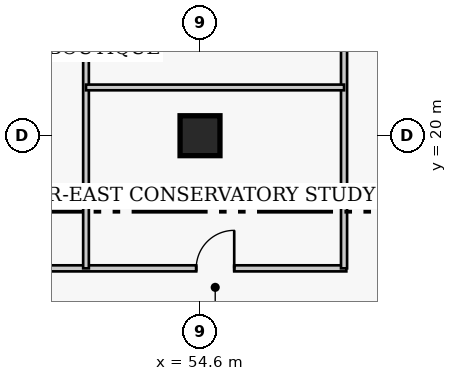
"""IFC4 building model, lengths in metres.
Left out: names, types, materials, properties, quantities, classifications, styles, units other than length and angle.
Written with IfcOpenShell. Run it as: python <this file> out.ifc"""

import sys

from ifc_helpers import new_model, si_unit, direction, frame, frame_2d, origin, origin_2d, place, context, subcontext, project, spatial, rectangle, extrude, element, fill, save


model = new_model("IFC4")
c1 = context("Model", 3, precision=1e-05, world=origin(), true_north=direction((0.0, 1.0)))
c2 = subcontext(c1, "Body", "Model", "MODEL_VIEW")
j1 = project(units=[si_unit("LENGTHUNIT", "METRE"), si_unit("PLANEANGLEUNIT", "RADIAN")], contexts=[c1])
p1 = place(None, origin())
s1 = spatial("IfcSite", under=j1, at=p1, CompositionType="ELEMENT")
p2 = place(p1, origin())
s2 = spatial("IfcBuilding", under=s1, at=p2, CompositionType="ELEMENT")
p3 = place(p2, frame((0.0, 0.0, 153.6)))
s3 = spatial("IfcBuildingStorey", under=s2, at=p3, CompositionType="ELEMENT", Elevation=153.6)
p4 = place(p3, frame((54.6, 20.0, 0.0), z_axis=(0.0, 0.0, 1.0), x_axis=(1.0, 0.0, 0.0)))
e1 = element("IfcColumn", 1, at=p4, inside=s3, PredefinedType="COLUMN", context=c2, shape_type="SweptSolid", body=[
    extrude(rectangle(XDim=1.05, YDim=1.05, at=origin_2d()), origin(), (0.0, 0.0, 1.0), 3.8),
])
p5 = place(p3, frame((35.85, 16.51, 0.0), z_axis=(0.0, 0.0, 1.0), x_axis=(1.0, 0.0, 0.0)))
e2 = element("IfcWall", 2, at=p5, inside=s3, PredefinedType="PARTITIONING", context=c2, shape_type="SweptSolid", body=[
    extrude(rectangle(XDim=22.6, YDim=0.16, at=frame_2d((11.3, 0.0))), origin(), (0.0, 0.0, 1.0), 3.55),
])
p6 = place(p5, frame((10.35, 0.0, 0.0)))
e3 = element("IfcOpeningElement", 3, at=p6, cuts=e2, PredefinedType="OPENING", context=c2, shape_type="SweptSolid", body=[
    extrude(rectangle(XDim=1.0, YDim=2.15, at=frame_2d((0.5, 1.075))), frame((0.0, 0.09, 0.0), z_axis=(0.0, -1.0, 0.0), x_axis=(1.0, 0.0, 0.0)), (0.0, 0.0, 1.0), 0.18),
])
p7 = place(p5, frame((18.65, 0.0, 0.0)))
e4 = element("IfcOpeningElement", 4, at=p7, cuts=e2, PredefinedType="OPENING", context=c2, shape_type="SweptSolid", body=[
    extrude(rectangle(XDim=1.0, YDim=2.15, at=frame_2d((0.5, 1.075))), frame((0.0, 0.09, 0.0), z_axis=(0.0, -1.0, 0.0), x_axis=(1.0, 0.0, 0.0)), (0.0, 0.0, 1.0), 0.18),
])
p8 = place(p3, frame((58.39, 16.51, 0.0), z_axis=(0.0, 0.0, 1.0), x_axis=(0.0, 1.0, 0.0)))
e5 = element("IfcWall", 5, at=p8, inside=s3, PredefinedType="PARTITIONING", context=c2, shape_type="SweptSolid", body=[
    extrude(rectangle(XDim=24.14, YDim=0.16, at=frame_2d((12.07, 0.0))), origin(), (0.0, 0.0, 1.0), 3.093),
])
p9 = place(p3, frame((51.6, 16.51, 0.0), z_axis=(0.0, 0.0, 1.0), x_axis=(0.0, 1.0, 0.0)))
e6 = element("IfcWall", 6, at=p9, inside=s3, PredefinedType="PARTITIONING", context=c2, shape_type="SweptSolid", body=[
    extrude(rectangle(XDim=10.64, YDim=0.15, at=frame_2d((5.32, 0.0))), origin(), (0.0, 0.0, 1.0), 3.55),
])
p10 = place(p3, frame((51.6, 21.27, 0.0), z_axis=(0.0, 0.0, 1.0), x_axis=(1.0, 0.0, 0.0)))
e7 = element("IfcWall", 7, at=p10, inside=s3, PredefinedType="PARTITIONING", context=c2, shape_type="SweptSolid", body=[
    extrude(rectangle(XDim=6.79, YDim=0.15, at=frame_2d((3.395, 0.0))), origin(), (0.0, 0.0, 1.0), 3.55),
])
p11 = place(p7, origin())
e8 = element("IfcDoor", 8, at=p11, inside=s3, OperationType="SINGLE_SWING_RIGHT", PredefinedType="DOOR", context=c2, shape_type="SweptSolid", body=[
    extrude(rectangle(XDim=1.0, YDim=2.15, at=frame_2d((0.5, 1.075))), frame((0.0, 0.025, 0.0), z_axis=(0.0, -1.0, 0.0), x_axis=(1.0, 0.0, 0.0)), (0.0, 0.0, 1.0), 0.05),
])
fill(e4, e8)
save(model, sys.argv[1])
